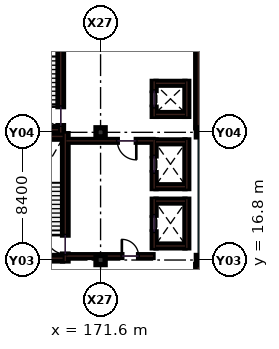
"""IFC4 building model, lengths in metres.
Left out: names, types, materials, properties, quantities, classifications, styles, units other than length and angle.
Written with IfcOpenShell. Run it as: python <this file> out.ifc"""

import sys

from ifc_helpers import new_model, si_unit, direction, frame, frame_2d, origin, origin_2d, place, context, subcontext, project, spatial, rectangle, extrude, element, fill, save


model = new_model("IFC4")
c1 = context("Model", 3, precision=1e-05, world=origin(), true_north=direction((0.0, 1.0)))
c2 = subcontext(c1, "Body", "Model", "MODEL_VIEW")
j1 = project(units=[si_unit("LENGTHUNIT", "METRE"), si_unit("PLANEANGLEUNIT", "RADIAN")], contexts=[c1])
p1 = place(None, origin())
s1 = spatial("IfcSite", under=j1, at=p1, CompositionType="ELEMENT")
p2 = place(p1, origin())
s2 = spatial("IfcBuilding", under=s1, at=p2, CompositionType="ELEMENT")
p3 = place(p2, frame((0.0, 0.0, 35.4)))
s3 = spatial("IfcBuildingStorey", under=s2, at=p3, CompositionType="ELEMENT", Elevation=35.4)
for number, where, z_axis, x_axis in (
    (1, (171.6, 16.8, 0.0), (0.0, 0.0, 1.0), (1.0, 0.0, 0.0)),
    (2, (171.6, 25.2, 0.0), (0.0, 0.0, 1.0), (1.0, 0.0, 0.0)),
    (3, (178.2, 16.8, 0.0), (0.0, 0.0, 1.0), (1.0, 0.0, 0.0)),
    (4, (178.2, 25.2, 0.0), (0.0, 0.0, 1.0), (1.0, 0.0, 0.0)),
):
    element("IfcColumn", number, at=place(p3, frame(where, z_axis=z_axis, x_axis=x_axis)), inside=s3, PredefinedType="COLUMN", context=c2, shape_type="SweptSolid", body=[
        extrude(rectangle(XDim=0.6, YDim=0.6, at=origin_2d()), origin(), (0.0, 0.0, 1.0), 3.9),
    ])
for number, where, z_axis, x_axis in (
    (5, (178.03, 8.695, 0.0), (0.0, 0.0, 1.0), (0.0, 1.0, 0.0)),
    (6, (178.03, 25.495, 0.0), (0.0, 0.0, 1.0), (0.0, 1.0, 0.0)),
):
    element("IfcWall", number, at=place(p3, frame(where, z_axis=z_axis, x_axis=x_axis)), inside=s3, PredefinedType="SHEAR", context=c2, shape_type="SweptSolid", body=[
        extrude(rectangle(XDim=7.81, YDim=0.34, at=frame_2d((3.905, 0.0))), origin(), (0.0, 0.0, 1.0), 3.68),
    ])
p4 = place(p3, frame((169.28, 16.74, 0.0), z_axis=(0.0, 0.0, 1.0), x_axis=(0.0, 1.0, 0.0)))
e7 = element("IfcWall", 7, at=p4, inside=s3, PredefinedType="SHEAR", context=c2, shape_type="SweptSolid", body=[
    extrude(rectangle(XDim=8.37, YDim=0.36, at=frame_2d((4.185, 0.0))), origin(), (0.0, 0.0, 1.0), 3.68),
])
p5 = place(p4, frame((0.45, 0.0, 0.0)))
e8 = element("IfcOpeningElement", 8, at=p5, cuts=e7, PredefinedType="OPENING", context=c2, shape_type="SweptSolid", body=[
    extrude(rectangle(XDim=1.25, YDim=2.15, at=frame_2d((0.625, 1.075))), frame((0.0, 0.19, 0.0), z_axis=(0.0, -1.0, 0.0), x_axis=(1.0, 0.0, 0.0)), (0.0, 0.0, 1.0), 0.38),
])
for number, where, z_axis, x_axis in (
    (9, (165.6, 24.93, 0.0), (0.0, 0.0, 1.0), (1.0, 0.0, 0.0)),
    (10, (165.6, 16.92, 0.0), (0.0, 0.0, 1.0), (1.0, 0.0, 0.0)),
):
    element("IfcWall", number, at=place(p3, frame(where, z_axis=z_axis, x_axis=x_axis)), inside=s3, PredefinedType="SHEAR", context=c2, shape_type="SweptSolid", body=[
        extrude(rectangle(XDim=3.5, YDim=0.36, at=frame_2d((1.75, 0.0))), origin(), (0.0, 0.0, 1.0), 3.68),
    ])
p6 = place(p3, frame((168.98, 25.19, 0.0), z_axis=(0.0, 0.0, 1.0), x_axis=(0.0, 1.0, 0.0)))
e11 = element("IfcWall", 11, at=p6, inside=s3, PredefinedType="SHEAR", context=c2, shape_type="SweptSolid", body=[
    extrude(rectangle(XDim=8.17, YDim=0.36, at=frame_2d((4.085, 0.0))), origin(), (0.0, 0.0, 1.0), 3.68),
])
p7 = place(p6, frame((0.45, 0.0, 0.0)))
e12 = element("IfcOpeningElement", 12, at=p7, cuts=e11, PredefinedType="OPENING", context=c2, shape_type="SweptSolid", body=[
    extrude(rectangle(XDim=1.25, YDim=2.15, at=frame_2d((0.625, 1.075))), frame((0.0, 0.19, 0.0), z_axis=(0.0, -1.0, 0.0), x_axis=(1.0, 0.0, 0.0)), (0.0, 0.0, 1.0), 0.38),
])
p8 = place(p3, frame((165.6, 25.37, 0.0), z_axis=(0.0, 0.0, 1.0), x_axis=(1.0, 0.0, 0.0)))
e13 = element("IfcWall", 13, at=p8, inside=s3, PredefinedType="SHEAR", context=c2, shape_type="SweptSolid", body=[
    extrude(rectangle(XDim=3.2, YDim=0.36, at=frame_2d((1.6, 0.0))), origin(), (0.0, 0.0, 1.0), 3.68),
])
p9 = place(p3, frame((175.125, 17.6, 0.0), z_axis=(0.0, 0.0, 1.0), x_axis=(0.0, 1.0, 0.0)))
e14 = element("IfcWall", 14, at=p9, inside=s3, PredefinedType="SHEAR", context=c2, shape_type="SweptSolid", body=[
    extrude(rectangle(XDim=3.2, YDim=0.25, at=frame_2d((1.6, 0.0))), origin(), (0.0, 0.0, 1.0), 3.68),
])
p10 = place(p9, frame((1.05, 0.0, 0.0)))
e15 = element("IfcOpeningElement", 15, at=p10, cuts=e14, PredefinedType="OPENING", context=c2, shape_type="SweptSolid", body=[
    extrude(rectangle(XDim=1.1, YDim=2.15, at=frame_2d((0.55, 1.075))), frame((0.0, 0.135, 0.0), z_axis=(0.0, -1.0, 0.0), x_axis=(1.0, 0.0, 0.0)), (0.0, 0.0, 1.0), 0.27),
])
p11 = place(p3, frame((177.275, 17.6, 0.0), z_axis=(0.0, 0.0, 1.0), x_axis=(0.0, 1.0, 0.0)))
e16 = element("IfcWall", 16, at=p11, inside=s3, PredefinedType="SHEAR", context=c2, shape_type="SweptSolid", body=[
    extrude(rectangle(XDim=3.2, YDim=0.25, at=frame_2d((1.6, 0.0))), origin(), (0.0, 0.0, 1.0), 3.68),
])
for number, where, z_axis, x_axis in (
    (17, (175.25, 17.725, 0.0), (0.0, 0.0, 1.0), (1.0, 0.0, 0.0)),
    (18, (175.25, 20.675, 0.0), (0.0, 0.0, 1.0), (1.0, 0.0, 0.0)),
):
    element("IfcWall", number, at=place(p3, frame(where, z_axis=z_axis, x_axis=x_axis)), inside=s3, PredefinedType="SHEAR", context=c2, shape_type="SweptSolid", body=[
        extrude(rectangle(XDim=1.9, YDim=0.25, at=frame_2d((0.95, 0.0))), origin(), (0.0, 0.0, 1.0), 3.68),
    ])
p12 = place(p3, frame((175.125, 21.5, 0.0), z_axis=(0.0, 0.0, 1.0), x_axis=(0.0, 1.0, 0.0)))
e19 = element("IfcWall", 19, at=p12, inside=s3, PredefinedType="SHEAR", context=c2, shape_type="SweptSolid", body=[
    extrude(rectangle(XDim=3.2, YDim=0.25, at=frame_2d((1.6, 0.0))), origin(), (0.0, 0.0, 1.0), 3.68),
])
p13 = place(p12, frame((1.05, 0.0, 0.0)))
e20 = element("IfcOpeningElement", 20, at=p13, cuts=e19, PredefinedType="OPENING", context=c2, shape_type="SweptSolid", body=[
    extrude(rectangle(XDim=1.1, YDim=2.15, at=frame_2d((0.55, 1.075))), frame((0.0, 0.135, 0.0), z_axis=(0.0, -1.0, 0.0), x_axis=(1.0, 0.0, 0.0)), (0.0, 0.0, 1.0), 0.27),
])
p14 = place(p3, frame((177.275, 21.5, 0.0), z_axis=(0.0, 0.0, 1.0), x_axis=(0.0, 1.0, 0.0)))
e21 = element("IfcWall", 21, at=p14, inside=s3, PredefinedType="SHEAR", context=c2, shape_type="SweptSolid", body=[
    extrude(rectangle(XDim=3.2, YDim=0.25, at=frame_2d((1.6, 0.0))), origin(), (0.0, 0.0, 1.0), 3.68),
])
for number, where, z_axis, x_axis in (
    (22, (175.25, 21.625, 0.0), (0.0, 0.0, 1.0), (1.0, 0.0, 0.0)),
    (23, (175.25, 24.575, 0.0), (0.0, 0.0, 1.0), (1.0, 0.0, 0.0)),
):
    element("IfcWall", number, at=place(p3, frame(where, z_axis=z_axis, x_axis=x_axis)), inside=s3, PredefinedType="SHEAR", context=c2, shape_type="SweptSolid", body=[
        extrude(rectangle(XDim=1.9, YDim=0.25, at=frame_2d((0.95, 0.0))), origin(), (0.0, 0.0, 1.0), 3.68),
    ])
p15 = place(p3, frame((175.125, 26.25, 0.0), z_axis=(0.0, 0.0, 1.0), x_axis=(0.0, 1.0, 0.0)))
e24 = element("IfcWall", 24, at=p15, inside=s3, PredefinedType="SHEAR", context=c2, shape_type="SweptSolid", body=[
    extrude(rectangle(XDim=2.3, YDim=0.25, at=frame_2d((1.15, 0.0))), origin(), (0.0, 0.0, 1.0), 3.68),
])
p16 = place(p15, frame((0.6, 0.0, 0.0)))
e25 = element("IfcOpeningElement", 25, at=p16, cuts=e24, PredefinedType="OPENING", context=c2, shape_type="SweptSolid", body=[
    extrude(rectangle(XDim=1.1, YDim=2.15, at=frame_2d((0.55, 1.075))), frame((0.0, 0.135, 0.0), z_axis=(0.0, -1.0, 0.0), x_axis=(1.0, 0.0, 0.0)), (0.0, 0.0, 1.0), 0.27),
])
p17 = place(p3, frame((177.275, 26.25, 0.0), z_axis=(0.0, 0.0, 1.0), x_axis=(0.0, 1.0, 0.0)))
e26 = element("IfcWall", 26, at=p17, inside=s3, PredefinedType="SHEAR", context=c2, shape_type="SweptSolid", body=[
    extrude(rectangle(XDim=2.3, YDim=0.25, at=frame_2d((1.15, 0.0))), origin(), (0.0, 0.0, 1.0), 3.68),
])
for number, where, z_axis, x_axis in (
    (27, (175.25, 26.375, 0.0), (0.0, 0.0, 1.0), (1.0, 0.0, 0.0)),
    (28, (175.25, 28.425, 0.0), (0.0, 0.0, 1.0), (1.0, 0.0, 0.0)),
):
    element("IfcWall", number, at=place(p3, frame(where, z_axis=z_axis, x_axis=x_axis)), inside=s3, PredefinedType="SHEAR", context=c2, shape_type="SweptSolid", body=[
        extrude(rectangle(XDim=1.9, YDim=0.25, at=frame_2d((0.95, 0.0))), origin(), (0.0, 0.0, 1.0), 3.68),
    ])
p18 = place(p3, frame((169.35, 24.64, 0.0), z_axis=(0.0, 0.0, 1.0), x_axis=(1.0, 0.0, 0.0)))
e29 = element("IfcWall", 29, at=p18, inside=s3, PredefinedType="SOLIDWALL", context=c2, shape_type="SweptSolid", body=[
    extrude(rectangle(XDim=5.7, YDim=0.18, at=frame_2d((2.85, 0.0))), origin(), (0.0, 0.0, 1.0), 3.68),
])
p19 = place(p18, frame((3.35, 0.0, 0.0)))
e30 = element("IfcOpeningElement", 30, at=p19, cuts=e29, PredefinedType="OPENING", context=c2, shape_type="SweptSolid", body=[
    extrude(rectangle(XDim=1.25, YDim=2.15, at=frame_2d((0.625, 1.075))), frame((0.0, 0.1, 0.0), z_axis=(0.0, -1.0, 0.0), x_axis=(1.0, 0.0, 0.0)), (0.0, 0.0, 1.0), 0.2),
])
p20 = place(p3, frame((169.35, 17.06, 0.0), z_axis=(0.0, 0.0, 1.0), x_axis=(1.0, 0.0, 0.0)))
e31 = element("IfcWall", 31, at=p20, inside=s3, PredefinedType="SOLIDWALL", context=c2, shape_type="SweptSolid", body=[
    extrude(rectangle(XDim=5.7, YDim=0.18, at=frame_2d((2.85, 0.0))), origin(), (0.0, 0.0, 1.0), 3.015),
])
p21 = place(p20, frame((3.65, 0.0, 0.0)))
e32 = element("IfcOpeningElement", 32, at=p21, cuts=e31, PredefinedType="OPENING", context=c2, shape_type="SweptSolid", body=[
    extrude(rectangle(XDim=1.1, YDim=2.15, at=frame_2d((0.55, 1.075))), frame((0.0, 0.1, 0.0), z_axis=(0.0, -1.0, 0.0), x_axis=(1.0, 0.0, 0.0)), (0.0, 0.0, 1.0), 0.2),
])
p22 = place(p5, origin())
e33 = element("IfcDoor", 33, at=p22, inside=s3, OperationType="SINGLE_SWING_RIGHT", PredefinedType="DOOR", context=c2, shape_type="SweptSolid", body=[
    extrude(rectangle(XDim=1.25, YDim=2.15, at=frame_2d((0.625, 1.075))), frame((0.0, 0.025, 0.0), z_axis=(0.0, -1.0, 0.0), x_axis=(1.0, 0.0, 0.0)), (0.0, 0.0, 1.0), 0.05),
])
fill(e8, e33)
p23 = place(p7, origin())
e34 = element("IfcDoor", 34, at=p23, inside=s3, OperationType="SINGLE_SWING_RIGHT", PredefinedType="DOOR", context=c2, shape_type="SweptSolid", body=[
    extrude(rectangle(XDim=1.25, YDim=2.15, at=frame_2d((0.625, 1.075))), frame((0.0, 0.025, 0.0), z_axis=(0.0, -1.0, 0.0), x_axis=(1.0, 0.0, 0.0)), (0.0, 0.0, 1.0), 0.05),
])
fill(e12, e34)
p24 = place(p10, origin())
e35 = element("IfcDoor", 35, at=p24, inside=s3, OperationType="SLIDING_TO_LEFT", PredefinedType="DOOR", context=c2, shape_type="SweptSolid", body=[
    extrude(rectangle(XDim=1.1, YDim=2.15, at=frame_2d((0.55, 1.075))), frame((0.0, 0.025, 0.0), z_axis=(0.0, -1.0, 0.0), x_axis=(1.0, 0.0, 0.0)), (0.0, 0.0, 1.0), 0.05),
])
fill(e15, e35)
p25 = place(p13, origin())
e36 = element("IfcDoor", 36, at=p25, inside=s3, OperationType="SLIDING_TO_LEFT", PredefinedType="DOOR", context=c2, shape_type="SweptSolid", body=[
    extrude(rectangle(XDim=1.1, YDim=2.15, at=frame_2d((0.55, 1.075))), frame((0.0, 0.025, 0.0), z_axis=(0.0, -1.0, 0.0), x_axis=(1.0, 0.0, 0.0)), (0.0, 0.0, 1.0), 0.05),
])
fill(e20, e36)
p26 = place(p16, origin())
e37 = element("IfcDoor", 37, at=p26, inside=s3, OperationType="SLIDING_TO_LEFT", PredefinedType="DOOR", context=c2, shape_type="SweptSolid", body=[
    extrude(rectangle(XDim=1.1, YDim=2.15, at=frame_2d((0.55, 1.075))), frame((0.0, 0.025, 0.0), z_axis=(0.0, -1.0, 0.0), x_axis=(1.0, 0.0, 0.0)), (0.0, 0.0, 1.0), 0.05),
])
fill(e25, e37)
p27 = place(p19, frame((1.25, 0.0, 0.0), z_axis=(0.0, 0.0, 1.0), x_axis=(-1.0, 0.0, 0.0)))
e38 = element("IfcDoor", 38, at=p27, inside=s3, OperationType="SINGLE_SWING_RIGHT", PredefinedType="DOOR", context=c2, shape_type="SweptSolid", body=[
    extrude(rectangle(XDim=1.25, YDim=2.15, at=frame_2d((0.625, 1.075))), frame((0.0, 0.025, 0.0), z_axis=(0.0, -1.0, 0.0), x_axis=(1.0, 0.0, 0.0)), (0.0, 0.0, 1.0), 0.05),
])
fill(e30, e38)
p28 = place(p21, origin())
e39 = element("IfcDoor", 39, at=p28, inside=s3, OperationType="SINGLE_SWING_LEFT", PredefinedType="DOOR", context=c2, shape_type="SweptSolid", body=[
    extrude(rectangle(XDim=1.1, YDim=2.15, at=frame_2d((0.55, 1.075))), frame((0.0, 0.025, 0.0), z_axis=(0.0, -1.0, 0.0), x_axis=(1.0, 0.0, 0.0)), (0.0, 0.0, 1.0), 0.05),
])
fill(e32, e39)
save(model, sys.argv[1])
